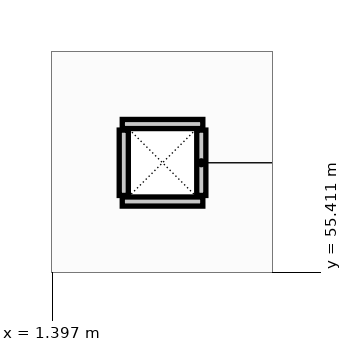
"""IFC4 building model, lengths in metres.
Left out: names, types, materials, properties, quantities, classifications, styles, units other than length and angle.
Written with IfcOpenShell. Run it as: python <this file> out.ifc"""

import sys

from ifc_helpers import new_model, si_unit, direction, frame, frame_2d, origin, place, context, subcontext, project, spatial, rectangle, extrude, element, save


model = new_model("IFC4")
c1 = context("Model", 3, precision=1e-05, world=origin(), true_north=direction((0.0, 1.0)))
c2 = subcontext(c1, "Body", "Model", "MODEL_VIEW")
j1 = project(units=[si_unit("LENGTHUNIT", "METRE"), si_unit("PLANEANGLEUNIT", "RADIAN")], contexts=[c1])
p1 = place(None, origin())
s1 = spatial("IfcSite", under=j1, at=p1, CompositionType="ELEMENT")
p2 = place(p1, origin())
s2 = spatial("IfcBuilding", under=s1, at=p2, CompositionType="ELEMENT")
p3 = place(p2, frame((0.0, 0.0, 4.8)))
s3 = spatial("IfcBuildingStorey", under=s2, at=p3, CompositionType="ELEMENT", Elevation=4.8)
for number, where, z_axis, x_axis in (
    (1, (2.32, 56.34, 0.0), (0.0, 0.0, 1.0), (1.0, 0.0, 0.0)),
    (2, (2.32, 57.36, 0.0), (0.0, 0.0, 1.0), (1.0, 0.0, 0.0)),
):
    element("IfcWall", number, at=place(p3, frame(where, z_axis=z_axis, x_axis=x_axis)), inside=s3, PredefinedType="PARTITIONING", context=c2, shape_type="SweptSolid", body=[
        extrude(rectangle(XDim=1.06, YDim=0.12, at=frame_2d((0.53, 0.0))), origin(), (0.0, 0.0, 1.0), 2.95),
    ])
for number, where, z_axis, x_axis in (
    (3, (2.34, 56.42, 0.0), (0.0, 0.0, 1.0), (0.0, 1.0, 0.0)),
    (4, (3.36, 56.42, 0.0), (0.0, 0.0, 1.0), (0.0, 1.0, 0.0)),
):
    element("IfcWall", number, at=place(p3, frame(where, z_axis=z_axis, x_axis=x_axis)), inside=s3, PredefinedType="PARTITIONING", context=c2, shape_type="SweptSolid", body=[
        extrude(rectangle(XDim=0.86, YDim=0.12, at=frame_2d((0.43, 0.0))), origin(), (0.0, 0.0, 1.0), 2.95),
    ])
save(model, sys.argv[1])
